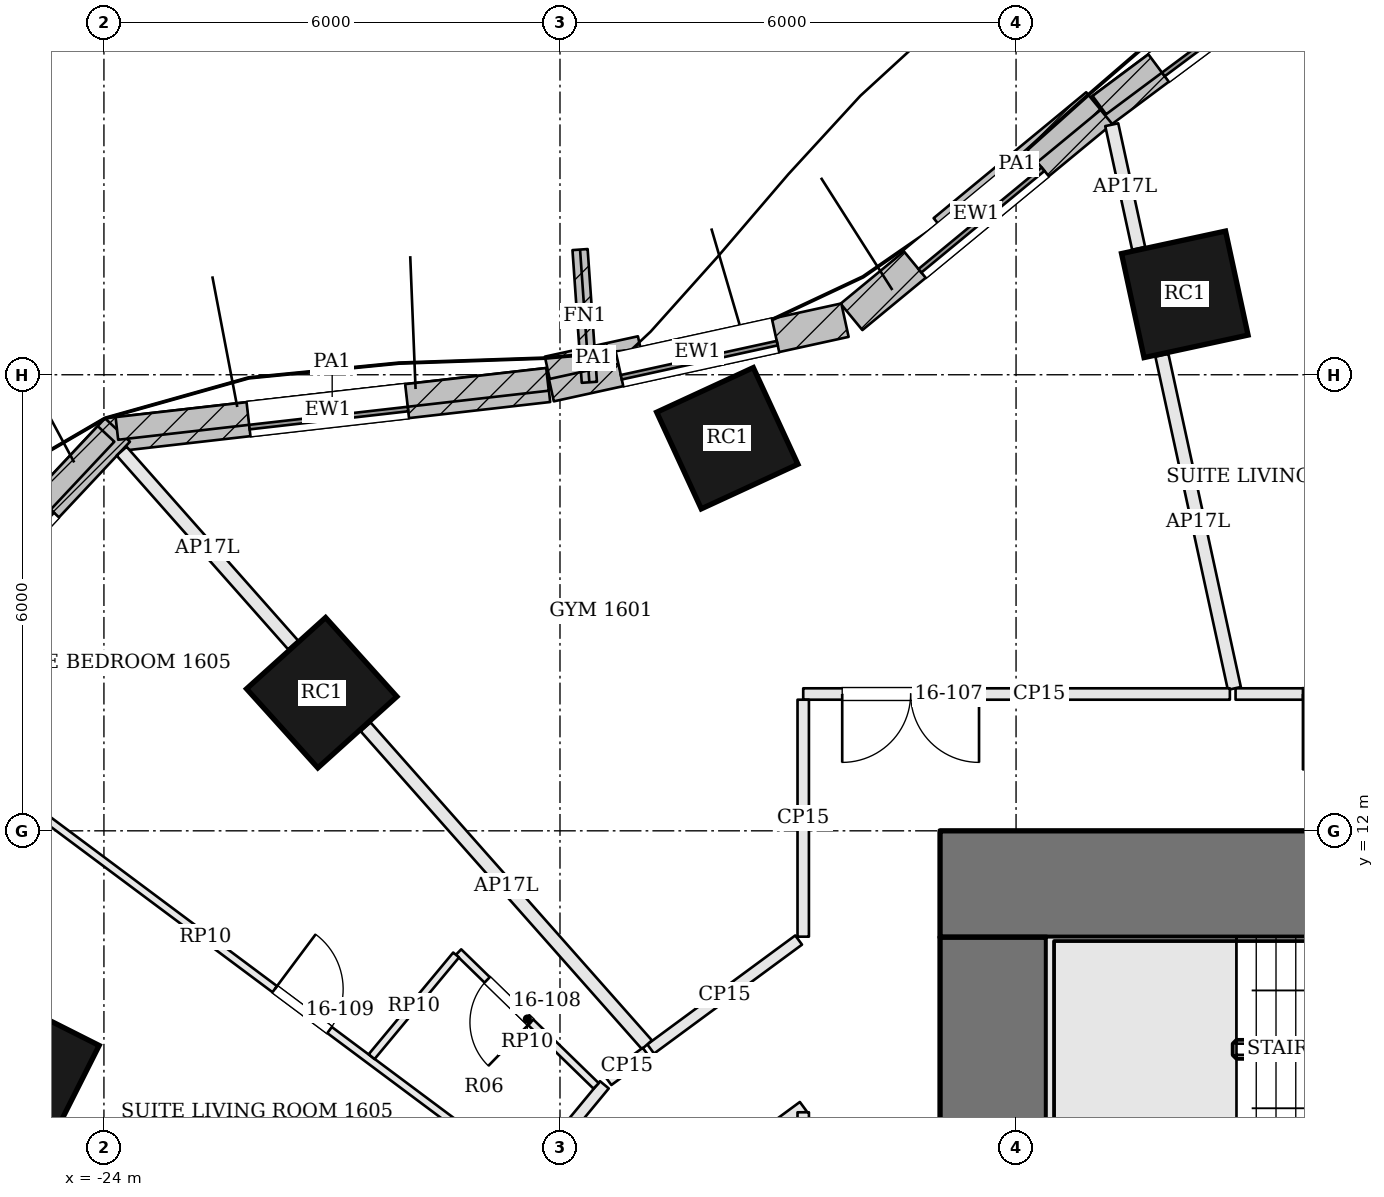
"""IFC4 building model, lengths in metres.
Left out: names, types, materials, properties, quantities, classifications, styles, units other than length and angle.
Written with IfcOpenShell. Run it as: python <this file> out.ifc"""

import sys

from ifc_helpers import new_model, si_unit, direction, frame, frame_2d, origin, origin_2d, place, context, subcontext, project, spatial, rectangle, extrude, element, fill, save


model = new_model("IFC4")
c1 = context("Model", 3, precision=1e-05, world=origin(), true_north=direction((0.0, 1.0)))
c2 = subcontext(c1, "Body", "Model", "MODEL_VIEW")
j1 = project(units=[si_unit("LENGTHUNIT", "METRE"), si_unit("PLANEANGLEUNIT", "RADIAN")], contexts=[c1])
p1 = place(None, origin())
s1 = spatial("IfcSite", under=j1, at=p1, CompositionType="ELEMENT")
p2 = place(p1, origin())
s2 = spatial("IfcBuilding", under=s1, at=p2, CompositionType="ELEMENT")
p3 = place(p2, frame((0.0, 0.0, 73.5)))
s3 = spatial("IfcBuildingStorey", under=s2, at=p3, CompositionType="ELEMENT", Elevation=73.5)
p4 = place(p3, frame((-13.0, 11.3, 0.0), z_axis=(0.0, 0.0, 1.0), x_axis=(1.0, 0.0, 0.0)))
e1 = element("IfcWall", 1, at=p4, inside=s3, PredefinedType="SHEAR", context=c2, shape_type="SweptSolid", body=[
    extrude(rectangle(XDim=26.0, YDim=1.4, at=frame_2d((13.0, 0.0))), origin(), (0.0, 0.0, 1.0), 3.6),
])
p5 = place(p4, frame((9.225, 0.0, 0.0)))
e2 = element("IfcOpeningElement", 2, at=p5, cuts=e1, PredefinedType="OPENING", context=c2, shape_type="SweptSolid", body=[
    extrude(rectangle(XDim=1.0, YDim=2.1, at=frame_2d((0.5, 1.05))), frame((0.0, 0.71, 0.0), z_axis=(0.0, -1.0, 0.0), x_axis=(1.0, 0.0, 0.0)), (0.0, 0.0, 1.0), 1.42),
])
p6 = place(p4, frame((11.825, 0.0, 0.0)))
e3 = element("IfcOpeningElement", 3, at=p6, cuts=e1, PredefinedType="OPENING", context=c2, shape_type="SweptSolid", body=[
    extrude(rectangle(XDim=0.7, YDim=2.1, at=frame_2d((0.35, 1.05))), frame((0.0, 0.71, 0.0), z_axis=(0.0, -1.0, 0.0), x_axis=(1.0, 0.0, 0.0)), (0.0, 0.0, 1.0), 1.42),
])
p7 = place(p4, frame((13.725, 0.0, 0.0)))
e4 = element("IfcOpeningElement", 4, at=p7, cuts=e1, PredefinedType="OPENING", context=c2, shape_type="SweptSolid", body=[
    extrude(rectangle(XDim=1.0, YDim=2.1, at=frame_2d((0.5, 1.05))), frame((0.0, 0.71, 0.0), z_axis=(0.0, -1.0, 0.0), x_axis=(1.0, 0.0, 0.0)), (0.0, 0.0, 1.0), 1.42),
])
p8 = place(p4, frame((16.225, 0.0, 0.0)))
e5 = element("IfcOpeningElement", 5, at=p8, cuts=e1, PredefinedType="OPENING", context=c2, shape_type="SweptSolid", body=[
    extrude(rectangle(XDim=0.9, YDim=2.1, at=frame_2d((0.45, 1.05))), frame((0.0, 0.71, 0.0), z_axis=(0.0, -1.0, 0.0), x_axis=(1.0, 0.0, 0.0)), (0.0, 0.0, 1.0), 1.42),
])
p9 = place(p3, frame((-12.3, -1.6, 0.0), z_axis=(0.0, 0.0, 1.0), x_axis=(0.0, 1.0, 0.0)))
e6 = element("IfcWall", 6, at=p9, inside=s3, PredefinedType="SHEAR", context=c2, shape_type="SweptSolid", body=[
    extrude(rectangle(XDim=12.2, YDim=1.4, at=frame_2d((6.1, 0.0))), origin(), (0.0, 0.0, 1.0), 3.6),
])
p10 = place(p9, frame((3.6, 0.0, 0.0)))
e7 = element("IfcOpeningElement", 7, at=p10, cuts=e6, PredefinedType="OPENING", context=c2, shape_type="SweptSolid", body=[
    extrude(rectangle(XDim=1.8, YDim=2.1, at=frame_2d((0.9, 1.05))), frame((0.0, 0.71, 0.0), z_axis=(0.0, -1.0, 0.0), x_axis=(1.0, 0.0, 0.0)), (0.0, 0.0, 1.0), 1.42),
])
for number, where, z_axis, x_axis in (
    (8, (-9.78, 19.058, 0.0), (0.0, 0.0, 1.0), (-0.977, -0.211, 0.0)),
    (9, (-15.799, 17.165, 0.0), (0.0, 0.0, 1.0), (-0.908, -0.419, 0.0)),
    (10, (-21.135, 13.817, 0.0), (0.0, 0.0, 1.0), (-0.743, -0.67, 0.0)),
    (11, (-25.003, 8.866, 0.0), (0.0, 0.0, 1.0), (-0.45, -0.893, 0.0)),
):
    element("IfcColumn", number, at=place(p3, frame(where, z_axis=z_axis, x_axis=x_axis)), inside=s3, PredefinedType="COLUMN", context=c2, shape_type="SweptSolid", body=[
        extrude(rectangle(XDim=1.4, YDim=1.4, at=origin_2d()), origin(), (0.0, 0.0, 1.0), 2.8),
    ])
p11 = place(p3, frame((-7.678, 23.859, 0.0), z_axis=(0.0, 0.0, 1.0), x_axis=(-0.801665619573, -0.597772728046, 0.0)))
e12 = element("IfcWall", 12, at=p11, inside=s3, PredefinedType="SOLIDWALL", context=c2, shape_type="SweptSolid", body=[
    extrude(rectangle(XDim=4.003, YDim=0.45, at=frame_2d((2.001, 0.0))), origin(), (0.0, 0.0, 1.0), 3.3),
])
p12 = place(p11, frame((0.951, 0.0, 0.9)))
e13 = element("IfcOpeningElement", 13, at=p12, cuts=e12, PredefinedType="OPENING", context=c2, shape_type="SweptSolid", body=[
    extrude(rectangle(XDim=2.1, YDim=1.8, at=frame_2d((1.05, 0.9))), frame((0.0, 0.235, 0.0), z_axis=(0.0, -1.0, 0.0), x_axis=(1.0, 0.0, 0.0)), (0.0, 0.0, 1.0), 0.47),
])
p13 = place(p3, frame((-10.879, 21.473, 0.0), z_axis=(0.0, 0.0, 1.0), x_axis=(-0.77124668946, -0.636536365023, 0.0)))
e14 = element("IfcWall", 14, at=p13, inside=s3, PredefinedType="SOLIDWALL", context=c2, shape_type="SweptSolid", body=[
    extrude(rectangle(XDim=4.261, YDim=0.45, at=frame_2d((2.13, 0.0))), origin(), (0.0, 0.0, 1.0), 3.3),
])
p14 = place(p13, frame((1.08, 0.0, 0.9)))
e15 = element("IfcOpeningElement", 15, at=p14, cuts=e14, PredefinedType="OPENING", context=c2, shape_type="SweptSolid", body=[
    extrude(rectangle(XDim=2.1, YDim=1.8, at=frame_2d((1.05, 0.9))), frame((0.0, 0.235, 0.0), z_axis=(0.0, -1.0, 0.0), x_axis=(1.0, 0.0, 0.0)), (0.0, 0.0, 1.0), 0.47),
])
p15 = place(p3, frame((-14.251, 18.718, 0.0), z_axis=(0.0, 0.0, 1.0), x_axis=(-0.976903627618, -0.213680374267, 0.0)))
e16 = element("IfcWall", 16, at=p15, inside=s3, PredefinedType="SOLIDWALL", context=c2, shape_type="SweptSolid", body=[
    extrude(rectangle(XDim=3.97, YDim=0.45, at=frame_2d((1.985, 0.0))), origin(), (0.0, 0.0, 1.0), 3.3),
])
p16 = place(p15, frame((0.935, 0.0, 0.9)))
e17 = element("IfcOpeningElement", 17, at=p16, cuts=e16, PredefinedType="OPENING", context=c2, shape_type="SweptSolid", body=[
    extrude(rectangle(XDim=2.1, YDim=1.8, at=frame_2d((1.05, 0.9))), frame((0.0, 0.235, 0.0), z_axis=(0.0, -1.0, 0.0), x_axis=(1.0, 0.0, 0.0)), (0.0, 0.0, 1.0), 0.47),
])
p17 = place(p3, frame((-18.154, 17.865, 0.0), z_axis=(0.0, 0.0, 1.0), x_axis=(-0.993572909097, -0.113193967633, 0.0)))
e18 = element("IfcWall", 18, at=p17, inside=s3, PredefinedType="SOLIDWALL", context=c2, shape_type="SweptSolid", body=[
    extrude(rectangle(XDim=5.839, YDim=0.45, at=frame_2d((2.919, 0.0))), origin(), (0.0, 0.0, 1.0), 3.3),
])
p18 = place(p17, frame((1.869, 0.0, 0.9)))
e19 = element("IfcOpeningElement", 19, at=p18, cuts=e18, PredefinedType="OPENING", context=c2, shape_type="SweptSolid", body=[
    extrude(rectangle(XDim=2.1, YDim=1.8, at=frame_2d((1.05, 0.9))), frame((0.0, 0.235, 0.0), z_axis=(0.0, -1.0, 0.0), x_axis=(1.0, 0.0, 0.0)), (0.0, 0.0, 1.0), 0.47),
])
p19 = place(p3, frame((-23.822, 17.273, 0.0), z_axis=(0.0, 0.0, 1.0), x_axis=(-0.684173167988, -0.729319598122, 0.0)))
e20 = element("IfcWall", 20, at=p19, inside=s3, PredefinedType="SOLIDWALL", context=c2, shape_type="SweptSolid", body=[
    extrude(rectangle(XDim=4.829, YDim=0.45, at=frame_2d((2.415, 0.0))), origin(), (0.0, 0.0, 1.0), 3.3),
])
p20 = place(p19, frame((1.365, 0.0, 0.9)))
e21 = element("IfcOpeningElement", 21, at=p20, cuts=e20, PredefinedType="OPENING", context=c2, shape_type="SweptSolid", body=[
    extrude(rectangle(XDim=2.1, YDim=1.8, at=frame_2d((1.05, 0.9))), frame((0.0, 0.235, 0.0), z_axis=(0.0, -1.0, 0.0), x_axis=(1.0, 0.0, 0.0)), (0.0, 0.0, 1.0), 0.47),
])
p21 = place(p3, frame((-17.614, 17.901, 0.0), z_axis=(0.0, 0.0, 1.0), x_axis=(-0.069750000204, 0.997564502913, 0.0)))
e22 = element("IfcWall", 22, at=p21, inside=s3, PredefinedType="SOLIDWALL", context=c2, shape_type="SweptSolid", body=[
    extrude(rectangle(XDim=1.75, YDim=0.2, at=frame_2d((0.875, 0.0))), origin(), (0.0, 0.0, 1.0), 3.3),
])
p22 = place(p3, frame((-7.806, 23.858, 3.6), z_axis=(0.0, 0.0, 1.0), x_axis=(-0.801649538596, -0.597794293439, 0.0)))
e23 = element("IfcWall", 23, at=p22, inside=s3, PredefinedType="PARAPET", context=c2, shape_type="SweptSolid", body=[
    extrude(rectangle(XDim=3.865, YDim=0.3, at=frame_2d((1.932, 0.0))), origin(), (0.0, 0.0, 1.0), 1.1),
])
p23 = place(p3, frame((-10.982, 21.601, 3.6), z_axis=(0.0, 0.0, 1.0), x_axis=(-0.771288080572, -0.63648621098, 0.0)))
e24 = element("IfcWall", 24, at=p23, inside=s3, PredefinedType="PARAPET", context=c2, shape_type="SweptSolid", body=[
    extrude(rectangle(XDim=2.603, YDim=0.3, at=frame_2d((1.301, 0.0))), origin(), (0.0, 0.0, 1.0), 1.1),
])
p24 = place(p3, frame((-16.943, 18.36, 3.6), z_axis=(0.0, 0.0, 1.0), x_axis=(-0.976910180777, -0.213650412343, 0.0)))
e25 = element("IfcWall", 25, at=p24, inside=s3, PredefinedType="PARAPET", context=c2, shape_type="SweptSolid", body=[
    extrude(rectangle(XDim=1.254, YDim=0.3, at=frame_2d((0.627, 0.0))), origin(), (0.0, 0.0, 1.0), 1.1),
])
p25 = place(p3, frame((-18.165, 17.939, 3.6), z_axis=(0.0, 0.0, 1.0), x_axis=(-0.99357552433, -0.113171009774, 0.0)))
e26 = element("IfcWall", 26, at=p25, inside=s3, PredefinedType="PARAPET", context=c2, shape_type="SweptSolid", body=[
    extrude(rectangle(XDim=5.702, YDim=0.3, at=frame_2d((2.851, 0.0))), origin(), (0.0, 0.0, 1.0), 1.1),
])
p26 = place(p3, frame((-23.972, 17.222, 3.6), z_axis=(0.0, 0.0, 1.0), x_axis=(-0.684173231326, -0.729319538705, 0.0)))
e27 = element("IfcWall", 27, at=p26, inside=s3, PredefinedType="PARAPET", context=c2, shape_type="SweptSolid", body=[
    extrude(rectangle(XDim=4.548, YDim=0.3, at=frame_2d((2.274, 0.0))), origin(), (0.0, 0.0, 1.0), 1.1),
])
p27 = place(p3, frame((-3.451, 13.8, 0.0), z_axis=(0.0, 0.0, 1.0), x_axis=(-1.0, 0.0, 0.0)))
e28 = element("IfcWall", 28, at=p27, inside=s3, PredefinedType="PARTITIONING", context=c2, shape_type="SweptSolid", body=[
    extrude(rectangle(XDim=5.661, YDim=0.15, at=frame_2d((2.831, 0.0))), origin(), (0.0, 0.0, 1.0), 2.684),
])
p28 = place(p27, frame((3.775, 0.0, 0.0)))
e29 = element("IfcOpeningElement", 29, at=p28, cuts=e28, PredefinedType="OPENING", context=c2, shape_type="SweptSolid", body=[
    extrude(rectangle(XDim=1.0, YDim=2.1, at=frame_2d((0.5, 1.05))), frame((0.0, 0.085, 0.0), z_axis=(0.0, -1.0, 0.0), x_axis=(1.0, 0.0, 0.0)), (0.0, 0.0, 1.0), 0.17),
])
p29 = place(p3, frame((-10.741, 21.29, 0.0), z_axis=(0.0, 0.0, 1.0), x_axis=(0.212673207196, -0.977123383683, 0.0)))
e30 = element("IfcWall", 30, at=p29, inside=s3, PredefinedType="PARTITIONING", context=c2, shape_type="SweptSolid", body=[
    extrude(rectangle(XDim=1.665, YDim=0.175, at=frame_2d((0.832, 0.0))), origin(), (0.0, 0.0, 1.0), 2.28),
])
p30 = place(p3, frame((-10.081, 18.256, 0.0), z_axis=(0.0, 0.0, 1.0), x_axis=(0.212553930516, -0.977149336909, 0.0)))
e31 = element("IfcWall", 31, at=p30, inside=s3, PredefinedType="PARTITIONING", context=c2, shape_type="SweptSolid", body=[
    extrude(rectangle(XDim=4.485, YDim=0.175, at=frame_2d((2.243, 0.0))), origin(), (0.0, 0.0, 1.0), 2.28),
])
p31 = place(p3, frame((-9.187, 13.8, 0.0), z_axis=(0.0, 0.0, 1.0), x_axis=(-1.0, 0.0, 0.0)))
e32 = element("IfcWall", 32, at=p31, inside=s3, PredefinedType="PARTITIONING", context=c2, shape_type="SweptSolid", body=[
    extrude(rectangle(XDim=5.613, YDim=0.15, at=frame_2d((2.807, 0.0))), origin(), (0.0, 0.0, 1.0), 2.684),
])
p32 = place(p31, frame((3.3, 0.0, 0.0)))
e33 = element("IfcOpeningElement", 33, at=p32, cuts=e32, PredefinedType="OPENING", context=c2, shape_type="SweptSolid", body=[
    extrude(rectangle(XDim=1.8, YDim=2.1, at=frame_2d((0.9, 1.05))), frame((0.0, 0.085, 0.0), z_axis=(0.0, -1.0, 0.0), x_axis=(1.0, 0.0, 0.0)), (0.0, 0.0, 1.0), 0.17),
])
p33 = place(p3, frame((-14.8, 13.725, 0.0), z_axis=(0.0, 0.0, 1.0), x_axis=(0.0, -1.0, 0.0)))
e34 = element("IfcWall", 34, at=p33, inside=s3, PredefinedType="PARTITIONING", context=c2, shape_type="SweptSolid", body=[
    extrude(rectangle(XDim=3.118, YDim=0.15, at=frame_2d((1.559, 0.0))), origin(), (0.0, 0.0, 1.0), 2.684),
])
p34 = place(p3, frame((-14.861, 10.563, 0.0), z_axis=(0.0, 0.0, 1.0), x_axis=(-0.805253823387, -0.592930248781, 0.0)))
e35 = element("IfcWall", 35, at=p34, inside=s3, PredefinedType="PARTITIONING", context=c2, shape_type="SweptSolid", body=[
    extrude(rectangle(XDim=2.417, YDim=0.15, at=frame_2d((1.208, 0.0))), origin(), (0.0, 0.0, 1.0), 2.684),
])
p35 = place(p3, frame((-23.767, 16.995, 0.0), z_axis=(0.0, 0.0, 1.0), x_axis=(0.662714726813, -0.748871945572, 0.0)))
e36 = element("IfcWall", 36, at=p35, inside=s3, PredefinedType="PARTITIONING", context=c2, shape_type="SweptSolid", body=[
    extrude(rectangle(XDim=3.403, YDim=0.175, at=frame_2d((1.702, 0.0))), origin(), (0.0, 0.0, 1.0), 2.28),
])
p36 = place(p3, frame((-20.558, 13.368, 0.0), z_axis=(0.0, 0.0, 1.0), x_axis=(0.662734219401, -0.748854695141, 0.0)))
e37 = element("IfcWall", 37, at=p36, inside=s3, PredefinedType="PARTITIONING", context=c2, shape_type="SweptSolid", body=[
    extrude(rectangle(XDim=5.585, YDim=0.175, at=frame_2d((2.792, 0.0))), origin(), (0.0, 0.0, 1.0), 2.28),
])
p37 = place(p3, frame((-16.867, 9.085, 0.0), z_axis=(0.0, 0.0, 1.0), x_axis=(-0.805381102541, -0.592757353113, 0.0)))
e38 = element("IfcWall", 38, at=p37, inside=s3, PredefinedType="PARTITIONING", context=c2, shape_type="SweptSolid", body=[
    extrude(rectangle(XDim=0.622, YDim=0.15, at=frame_2d((0.311, 0.0))), origin(), (0.0, 0.0, 1.0), 2.684),
])
p38 = place(p3, frame((-17.416, 8.659, 0.0), z_axis=(0.0, 0.0, 1.0), x_axis=(-0.636865073139, -0.770975277564, 0.0)))
e39 = element("IfcWall", 39, at=p38, inside=s3, PredefinedType="PARTITIONING", context=c2, shape_type="SweptSolid", body=[
    extrude(rectangle(XDim=2.312, YDim=0.15, at=frame_2d((1.156, 0.0))), origin(), (0.0, 0.0, 1.0), 2.684),
])
p39 = place(p3, frame((-27.056, 8.96, 0.0), z_axis=(0.0, 0.0, 1.0), x_axis=(0.910158921773, -0.414259263164, 0.0)))
e40 = element("IfcWall", 40, at=p39, inside=s3, PredefinedType="PARTITIONING", context=c2, shape_type="SweptSolid", body=[
    extrude(rectangle(XDim=8.263, YDim=0.175, at=frame_2d((4.131, 0.0))), origin(), (0.0, 0.0, 1.0), 2.28),
])
p40 = place(p3, frame((-16.062, 7.443, 0.0), z_axis=(0.0, 0.0, 1.0), x_axis=(0.805204624788, 0.5929970592, 0.0)))
e41 = element("IfcWall", 41, at=p40, inside=s3, PredefinedType="PARTITIONING", context=c2, shape_type="SweptSolid", body=[
    extrude(rectangle(XDim=1.567, YDim=0.15, at=frame_2d((0.783, 0.0))), origin(), (0.0, 0.0, 1.0), 2.684),
])
p41 = place(p3, frame((-14.8, 8.297, 0.0), z_axis=(0.0, 0.0, 1.0), x_axis=(0.0, -1.0, 0.0)))
e42 = element("IfcWall", 42, at=p41, inside=s3, PredefinedType="PARTITIONING", context=c2, shape_type="SweptSolid", body=[
    extrude(rectangle(XDim=13.097, YDim=0.15, at=frame_2d((6.549, 0.0))), origin(), (0.0, 0.0, 1.0), 2.684),
])
p42 = place(p41, frame((3.611, 0.0, 0.0)))
e43 = element("IfcOpeningElement", 43, at=p42, cuts=e42, PredefinedType="OPENING", context=c2, shape_type="SweptSolid", body=[
    extrude(rectangle(XDim=1.0, YDim=2.1, at=frame_2d((0.5, 1.05))), frame((0.0, 0.085, 0.0), z_axis=(0.0, -1.0, 0.0), x_axis=(1.0, 0.0, 0.0)), (0.0, 0.0, 1.0), 0.17),
])
p43 = place(p3, frame((-26.844, 13.716, 0.0), z_axis=(0.0, 0.0, 1.0), x_axis=(0.801523054034, -0.597963873367, 0.0)))
e44 = element("IfcWall", 44, at=p43, inside=s3, PredefinedType="PARTITIONING", context=c2, shape_type="SweptSolid", body=[
    extrude(rectangle(XDim=10.427, YDim=0.1, at=frame_2d((5.214, 0.0))), origin(), (0.0, 0.0, 1.0), 2.784),
])
p44 = place(p43, frame((6.352, 0.0, 0.0)))
e45 = element("IfcOpeningElement", 45, at=p44, cuts=e44, PredefinedType="OPENING", context=c2, shape_type="SweptSolid", body=[
    extrude(rectangle(XDim=0.9, YDim=2.4, at=frame_2d((0.45, 1.2))), frame((0.0, 0.06, 0.0), z_axis=(0.0, -1.0, 0.0), x_axis=(1.0, 0.0, 0.0)), (0.0, 0.0, 1.0), 0.12),
])
p45 = place(p3, frame((-17.525, 8.644, 0.0), z_axis=(0.0, 0.0, 1.0), x_axis=(-0.716661927844, 0.697420734692, 0.0)))
e46 = element("IfcWall", 46, at=p45, inside=s3, PredefinedType="PARTITIONING", context=c2, shape_type="SweptSolid", body=[
    extrude(rectangle(XDim=2.525, YDim=0.1, at=frame_2d((1.262, 0.0))), origin(), (0.0, 0.0, 1.0), 2.784),
])
p46 = place(p45, frame((1.2, 0.0, 0.0)))
e47 = element("IfcOpeningElement", 47, at=p46, cuts=e46, PredefinedType="OPENING", context=c2, shape_type="SweptSolid", body=[
    extrude(rectangle(XDim=0.8, YDim=2.1, at=frame_2d((0.4, 1.05))), frame((0.0, 0.06, 0.0), z_axis=(0.0, -1.0, 0.0), x_axis=(1.0, 0.0, 0.0)), (0.0, 0.0, 1.0), 0.12),
])
p47 = place(p3, frame((-19.366, 10.367, 0.0), z_axis=(0.0, 0.0, 1.0), x_axis=(-0.63913466048, -0.76909484836, 0.0)))
e48 = element("IfcWall", 48, at=p47, inside=s3, PredefinedType="PARTITIONING", context=c2, shape_type="SweptSolid", body=[
    extrude(rectangle(XDim=1.74, YDim=0.1, at=frame_2d((0.87, 0.0))), origin(), (0.0, 0.0, 1.0), 2.784),
])
p48 = place(p12, origin())
e49 = element("IfcWindow", 49, at=p48, inside=s3, PartitioningType="SINGLE_PANEL", PredefinedType="WINDOW", context=c2, shape_type="SweptSolid", body=[
    extrude(rectangle(XDim=2.1, YDim=1.8, at=frame_2d((1.05, 0.9))), frame((0.0, 0.135, 0.0), z_axis=(0.0, -1.0, 0.0), x_axis=(1.0, 0.0, 0.0)), (0.0, 0.0, 1.0), 0.06),
])
fill(e13, e49)
p49 = place(p14, origin())
e50 = element("IfcWindow", 50, at=p49, inside=s3, PartitioningType="SINGLE_PANEL", PredefinedType="WINDOW", context=c2, shape_type="SweptSolid", body=[
    extrude(rectangle(XDim=2.1, YDim=1.8, at=frame_2d((1.05, 0.9))), frame((0.0, 0.135, 0.0), z_axis=(0.0, -1.0, 0.0), x_axis=(1.0, 0.0, 0.0)), (0.0, 0.0, 1.0), 0.06),
])
fill(e15, e50)
p50 = place(p16, origin())
e51 = element("IfcWindow", 51, at=p50, inside=s3, PartitioningType="SINGLE_PANEL", PredefinedType="WINDOW", context=c2, shape_type="SweptSolid", body=[
    extrude(rectangle(XDim=2.1, YDim=1.8, at=frame_2d((1.05, 0.9))), frame((0.0, 0.135, 0.0), z_axis=(0.0, -1.0, 0.0), x_axis=(1.0, 0.0, 0.0)), (0.0, 0.0, 1.0), 0.06),
])
fill(e17, e51)
p51 = place(p18, origin())
e52 = element("IfcWindow", 52, at=p51, inside=s3, PartitioningType="SINGLE_PANEL", PredefinedType="WINDOW", context=c2, shape_type="SweptSolid", body=[
    extrude(rectangle(XDim=2.1, YDim=1.8, at=frame_2d((1.05, 0.9))), frame((0.0, 0.135, 0.0), z_axis=(0.0, -1.0, 0.0), x_axis=(1.0, 0.0, 0.0)), (0.0, 0.0, 1.0), 0.06),
])
fill(e19, e52)
p52 = place(p20, origin())
e53 = element("IfcWindow", 53, at=p52, inside=s3, PartitioningType="SINGLE_PANEL", PredefinedType="WINDOW", context=c2, shape_type="SweptSolid", body=[
    extrude(rectangle(XDim=2.1, YDim=1.8, at=frame_2d((1.05, 0.9))), frame((0.0, 0.135, 0.0), z_axis=(0.0, -1.0, 0.0), x_axis=(1.0, 0.0, 0.0)), (0.0, 0.0, 1.0), 0.06),
])
fill(e21, e53)
p53 = place(p28, origin())
e54 = element("IfcDoor", 54, at=p53, inside=s3, OperationType="SINGLE_SWING_RIGHT", PredefinedType="DOOR", context=c2, shape_type="SweptSolid", body=[
    extrude(rectangle(XDim=1.0, YDim=2.1, at=frame_2d((0.5, 1.05))), frame((0.0, 0.025, 0.0), z_axis=(0.0, -1.0, 0.0), x_axis=(1.0, 0.0, 0.0)), (0.0, 0.0, 1.0), 0.05),
])
fill(e29, e54)
p54 = place(p32, origin())
e55 = element("IfcDoor", 55, at=p54, inside=s3, OperationType="DOUBLE_DOOR_SINGLE_SWING", PredefinedType="DOOR", context=c2, shape_type="SweptSolid", body=[
    extrude(rectangle(XDim=1.8, YDim=2.1, at=frame_2d((0.9, 1.05))), frame((0.0, 0.025, 0.0), z_axis=(0.0, -1.0, 0.0), x_axis=(1.0, 0.0, 0.0)), (0.0, 0.0, 1.0), 0.05),
])
fill(e33, e55)
p55 = place(p46, origin())
e56 = element("IfcDoor", 56, at=p55, inside=s3, OperationType="SINGLE_SWING_LEFT", PredefinedType="DOOR", context=c2, shape_type="SweptSolid", body=[
    extrude(rectangle(XDim=0.8, YDim=2.1, at=frame_2d((0.4, 1.05))), frame((0.0, 0.025, 0.0), z_axis=(0.0, -1.0, 0.0), x_axis=(1.0, 0.0, 0.0)), (0.0, 0.0, 1.0), 0.05),
])
fill(e47, e56)
p56 = place(p44, origin())
e57 = element("IfcDoor", 57, at=p56, inside=s3, OperationType="SINGLE_SWING_LEFT", PredefinedType="DOOR", context=c2, shape_type="SweptSolid", body=[
    extrude(rectangle(XDim=0.9, YDim=2.4, at=frame_2d((0.45, 1.2))), frame((0.0, 0.025, 0.0), z_axis=(0.0, -1.0, 0.0), x_axis=(1.0, 0.0, 0.0)), (0.0, 0.0, 1.0), 0.05),
])
fill(e45, e57)
save(model, sys.argv[1])
